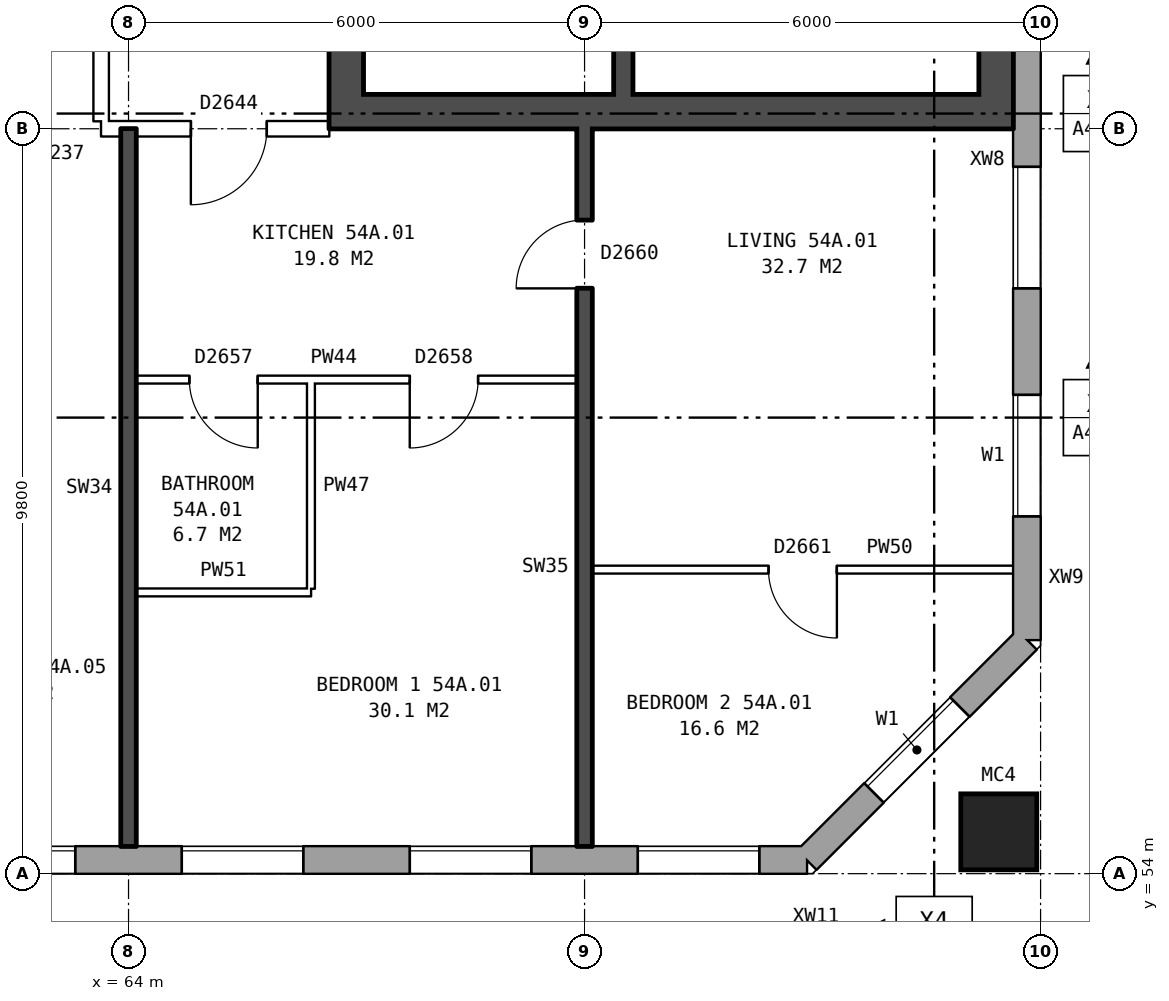
"""IFC4 building model, lengths in metres.
Left out: names, types, materials, properties, quantities, classifications, styles, units other than length and angle.
Written with IfcOpenShell. Run it as: python <this file> out.ifc"""

import sys

from ifc_helpers import new_model, si_unit, direction, frame, frame_2d, origin, origin_2d, place, context, subcontext, project, spatial, rectangle, hollow_rectangle, extrude, element, fill, save


model = new_model("IFC4")
c1 = context("Model", 3, precision=1e-05, world=origin(), true_north=direction((0.0, 1.0)))
c2 = subcontext(c1, "Body", "Model", "MODEL_VIEW")
j1 = project(units=[si_unit("LENGTHUNIT", "METRE"), si_unit("PLANEANGLEUNIT", "RADIAN")], contexts=[c1])
p1 = place(None, origin())
s1 = spatial("IfcSite", under=j1, at=p1, CompositionType="ELEMENT")
p2 = place(p1, origin())
s2 = spatial("IfcBuilding", under=s1, at=p2, CompositionType="ELEMENT")
p3 = place(p2, frame((0.0, 0.0, 191.3)))
s3 = spatial("IfcBuildingStorey", under=s2, at=p3, CompositionType="ELEMENT", Elevation=191.3)
p4 = place(p3, frame((75.45, 54.55, 0.0), z_axis=(0.0, 0.0, 1.0), x_axis=(1.0, 0.0, 0.0)))
e1 = element("IfcColumn", 1, at=p4, inside=s3, PredefinedType="COLUMN", context=c2, shape_type="SweptSolid", body=[
    extrude(hollow_rectangle(XDim=1.0, YDim=1.0, WallThickness=0.055, at=origin_2d()), origin(), (0.0, 0.0, 1.0), 3.1),
])
p5 = place(p3, frame((33.325, 54.18, 0.0), z_axis=(0.0, 0.0, 1.0), x_axis=(1.0, 0.0, 0.0)))
e2 = element("IfcWall", 2, at=p5, inside=s3, PredefinedType="STANDARD", context=c2, shape_type="SweptSolid", body=[
    extrude(rectangle(XDim=39.601, YDim=0.36, at=frame_2d((19.8, 0.0))), origin(), (0.0, 0.0, 1.0), 2.85),
])
p6 = place(p5, frame((1.375, 0.0, 0.8)))
e3 = element("IfcOpeningElement", 3, at=p6, cuts=e2, PredefinedType="OPENING", context=c2, shape_type="SweptSolid", body=[
    extrude(rectangle(XDim=1.6, YDim=1.8, at=frame_2d((0.8, 0.9))), frame((0.0, 0.19, 0.0), z_axis=(0.0, -1.0, 0.0), x_axis=(1.0, 0.0, 0.0)), (0.0, 0.0, 1.0), 0.38),
])
p7 = place(p5, frame((4.375, 0.0, 0.8)))
e4 = element("IfcOpeningElement", 4, at=p7, cuts=e2, PredefinedType="OPENING", context=c2, shape_type="SweptSolid", body=[
    extrude(rectangle(XDim=1.6, YDim=1.8, at=frame_2d((0.8, 0.9))), frame((0.0, 0.19, 0.0), z_axis=(0.0, -1.0, 0.0), x_axis=(1.0, 0.0, 0.0)), (0.0, 0.0, 1.0), 0.38),
])
p8 = place(p5, frame((7.375, 0.0, 0.8)))
e5 = element("IfcOpeningElement", 5, at=p8, cuts=e2, PredefinedType="OPENING", context=c2, shape_type="SweptSolid", body=[
    extrude(rectangle(XDim=1.6, YDim=1.8, at=frame_2d((0.8, 0.9))), frame((0.0, 0.19, 0.0), z_axis=(0.0, -1.0, 0.0), x_axis=(1.0, 0.0, 0.0)), (0.0, 0.0, 1.0), 0.38),
])
p9 = place(p5, frame((10.375, 0.0, 0.8)))
e6 = element("IfcOpeningElement", 6, at=p9, cuts=e2, PredefinedType="OPENING", context=c2, shape_type="SweptSolid", body=[
    extrude(rectangle(XDim=1.6, YDim=1.8, at=frame_2d((0.8, 0.9))), frame((0.0, 0.19, 0.0), z_axis=(0.0, -1.0, 0.0), x_axis=(1.0, 0.0, 0.0)), (0.0, 0.0, 1.0), 0.38),
])
p10 = place(p5, frame((13.375, 0.0, 0.8)))
e7 = element("IfcOpeningElement", 7, at=p10, cuts=e2, PredefinedType="OPENING", context=c2, shape_type="SweptSolid", body=[
    extrude(rectangle(XDim=1.6, YDim=1.8, at=frame_2d((0.8, 0.9))), frame((0.0, 0.19, 0.0), z_axis=(0.0, -1.0, 0.0), x_axis=(1.0, 0.0, 0.0)), (0.0, 0.0, 1.0), 0.38),
])
p11 = place(p5, frame((15.825, 0.0, 0.8)))
e8 = element("IfcOpeningElement", 8, at=p11, cuts=e2, PredefinedType="OPENING", context=c2, shape_type="SweptSolid", body=[
    extrude(rectangle(XDim=1.4, YDim=1.8, at=frame_2d((0.7, 0.9))), frame((0.0, 0.19, 0.0), z_axis=(0.0, -1.0, 0.0), x_axis=(1.0, 0.0, 0.0)), (0.0, 0.0, 1.0), 0.38),
])
p12 = place(p5, frame((18.975, 0.0, 0.15)))
e9 = element("IfcOpeningElement", 9, at=p12, cuts=e2, PredefinedType="OPENING", context=c2, shape_type="SweptSolid", body=[
    extrude(rectangle(XDim=1.6, YDim=1.2, at=frame_2d((0.8, 0.6))), frame((0.0, 0.19, 0.0), z_axis=(0.0, -1.0, 0.0), x_axis=(1.0, 0.0, 0.0)), (0.0, 0.0, 1.0), 0.38),
])
p13 = place(p5, frame((22.375, 0.0, 0.8)))
e10 = element("IfcOpeningElement", 10, at=p13, cuts=e2, PredefinedType="OPENING", context=c2, shape_type="SweptSolid", body=[
    extrude(rectangle(XDim=1.6, YDim=1.8, at=frame_2d((0.8, 0.9))), frame((0.0, 0.19, 0.0), z_axis=(0.0, -1.0, 0.0), x_axis=(1.0, 0.0, 0.0)), (0.0, 0.0, 1.0), 0.38),
])
p14 = place(p5, frame((25.375, 0.0, 0.8)))
e11 = element("IfcOpeningElement", 11, at=p14, cuts=e2, PredefinedType="OPENING", context=c2, shape_type="SweptSolid", body=[
    extrude(rectangle(XDim=1.6, YDim=1.8, at=frame_2d((0.8, 0.9))), frame((0.0, 0.19, 0.0), z_axis=(0.0, -1.0, 0.0), x_axis=(1.0, 0.0, 0.0)), (0.0, 0.0, 1.0), 0.38),
])
p15 = place(p5, frame((28.375, 0.0, 0.8)))
e12 = element("IfcOpeningElement", 12, at=p15, cuts=e2, PredefinedType="OPENING", context=c2, shape_type="SweptSolid", body=[
    extrude(rectangle(XDim=1.6, YDim=1.8, at=frame_2d((0.8, 0.9))), frame((0.0, 0.19, 0.0), z_axis=(0.0, -1.0, 0.0), x_axis=(1.0, 0.0, 0.0)), (0.0, 0.0, 1.0), 0.38),
])
p16 = place(p5, frame((31.375, 0.0, 0.8)))
e13 = element("IfcOpeningElement", 13, at=p16, cuts=e2, PredefinedType="OPENING", context=c2, shape_type="SweptSolid", body=[
    extrude(rectangle(XDim=1.6, YDim=1.8, at=frame_2d((0.8, 0.9))), frame((0.0, 0.19, 0.0), z_axis=(0.0, -1.0, 0.0), x_axis=(1.0, 0.0, 0.0)), (0.0, 0.0, 1.0), 0.38),
])
p17 = place(p5, frame((34.375, 0.0, 0.8)))
e14 = element("IfcOpeningElement", 14, at=p17, cuts=e2, PredefinedType="OPENING", context=c2, shape_type="SweptSolid", body=[
    extrude(rectangle(XDim=1.6, YDim=1.8, at=frame_2d((0.8, 0.9))), frame((0.0, 0.19, 0.0), z_axis=(0.0, -1.0, 0.0), x_axis=(1.0, 0.0, 0.0)), (0.0, 0.0, 1.0), 0.38),
])
p18 = place(p5, frame((37.375, 0.0, 0.8)))
e15 = element("IfcOpeningElement", 15, at=p18, cuts=e2, PredefinedType="OPENING", context=c2, shape_type="SweptSolid", body=[
    extrude(rectangle(XDim=1.6, YDim=1.8, at=frame_2d((0.8, 0.9))), frame((0.0, 0.19, 0.0), z_axis=(0.0, -1.0, 0.0), x_axis=(1.0, 0.0, 0.0)), (0.0, 0.0, 1.0), 0.38),
])
p19 = place(p5, frame((17.525, 0.0, 1.6)))
e16 = element("IfcOpeningElement", 16, at=p19, cuts=e2, PredefinedType="OPENING", context=c2, shape_type="SweptSolid", body=[
    extrude(rectangle(XDim=0.6, YDim=0.9, at=frame_2d((0.3, 0.45))), frame((0.0, 0.19, 0.0), z_axis=(0.0, -1.0, 0.0), x_axis=(1.0, 0.0, 0.0)), (0.0, 0.0, 1.0), 0.38),
])
p20 = place(p3, frame((72.925, 54.18, 0.0), z_axis=(0.0, 0.0, 1.0), x_axis=(0.707106781187, 0.707106781187, 0.0)))
e17 = element("IfcWall", 17, at=p20, inside=s3, PredefinedType="STANDARD", context=c2, shape_type="SweptSolid", body=[
    extrude(rectangle(XDim=4.094, YDim=0.36, at=frame_2d((2.047, 0.0))), origin(), (0.0, 0.0, 1.0), 2.85),
])
p21 = place(p20, frame((1.247, 0.0, 0.8)))
e18 = element("IfcOpeningElement", 18, at=p21, cuts=e17, PredefinedType="OPENING", context=c2, shape_type="SweptSolid", body=[
    extrude(rectangle(XDim=1.6, YDim=1.8, at=frame_2d((0.8, 0.9))), frame((0.0, 0.19, 0.0), z_axis=(0.0, -1.0, 0.0), x_axis=(1.0, 0.0, 0.0)), (0.0, 0.0, 1.0), 0.38),
])
p22 = place(p3, frame((75.82, 57.075, 0.0), z_axis=(0.0, 0.0, 1.0), x_axis=(0.0, 1.0, 0.0)))
e19 = element("IfcWall", 19, at=p22, inside=s3, PredefinedType="STANDARD", context=c2, shape_type="SweptSolid", body=[
    extrude(rectangle(XDim=6.522, YDim=0.36, at=frame_2d((3.261, 0.0))), origin(), (0.0, 0.0, 1.0), 2.85),
])
p23 = place(p22, frame((1.625, 0.0, 0.8)))
e20 = element("IfcOpeningElement", 20, at=p23, cuts=e19, PredefinedType="OPENING", context=c2, shape_type="SweptSolid", body=[
    extrude(rectangle(XDim=1.6, YDim=1.8, at=frame_2d((0.8, 0.9))), frame((0.0, 0.19, 0.0), z_axis=(0.0, -1.0, 0.0), x_axis=(1.0, 0.0, 0.0)), (0.0, 0.0, 1.0), 0.38),
])
p24 = place(p22, frame((4.625, 0.0, 0.8)))
e21 = element("IfcOpeningElement", 21, at=p24, cuts=e19, PredefinedType="OPENING", context=c2, shape_type="SweptSolid", body=[
    extrude(rectangle(XDim=1.6, YDim=1.8, at=frame_2d((0.8, 0.9))), frame((0.0, 0.19, 0.0), z_axis=(0.0, -1.0, 0.0), x_axis=(1.0, 0.0, 0.0)), (0.0, 0.0, 1.0), 0.38),
])
p25 = place(p3, frame((75.82, 63.597, 0.0), z_axis=(0.0, 0.0, 1.0), x_axis=(0.0, 1.0, 0.0)))
e22 = element("IfcWall", 22, at=p25, inside=s3, PredefinedType="STANDARD", context=c2, shape_type="SweptSolid", body=[
    extrude(rectangle(XDim=0.806, YDim=0.36, at=frame_2d((0.403, 0.0))), origin(), (0.0, 0.0, 1.0), 1.947),
])
p26 = place(p3, frame((75.82, 64.403, 0.0), z_axis=(0.0, 0.0, 1.0), x_axis=(0.0, 1.0, 0.0)))
e23 = element("IfcWall", 23, at=p26, inside=s3, PredefinedType="STANDARD", context=c2, shape_type="SweptSolid", body=[
    extrude(rectangle(XDim=11.194, YDim=0.36, at=frame_2d((5.597, 0.0))), origin(), (0.0, 0.0, 1.0), 2.85),
])
p27 = place(p3, frame((66.865, 63.8, 0.0), z_axis=(0.0, 0.0, 1.0), x_axis=(0.0, 1.0, 0.0)))
e24 = element("IfcWall", 24, at=p27, inside=s3, PredefinedType="SHEAR", context=c2, shape_type="SweptSolid", body=[
    extrude(rectangle(XDim=12.4, YDim=0.45, at=frame_2d((6.2, 0.0))), origin(), (0.0, 0.0, 1.0), 2.85),
])
p28 = place(p27, frame((1.325, 0.0, 0.0)))
e25 = element("IfcOpeningElement", 25, at=p28, cuts=e24, PredefinedType="OPENING", context=c2, shape_type="SweptSolid", body=[
    extrude(rectangle(XDim=1.1, YDim=2.1, at=frame_2d((0.55, 1.05))), frame((0.0, 0.235, 0.0), z_axis=(0.0, -1.0, 0.0), x_axis=(1.0, 0.0, 0.0)), (0.0, 0.0, 1.0), 0.47),
])
p29 = place(p27, frame((3.6, 0.0, 0.0)))
e26 = element("IfcOpeningElement", 26, at=p29, cuts=e24, PredefinedType="OPENING", context=c2, shape_type="SweptSolid", body=[
    extrude(rectangle(XDim=1.1, YDim=2.1, at=frame_2d((0.55, 1.05))), frame((0.0, 0.235, 0.0), z_axis=(0.0, -1.0, 0.0), x_axis=(1.0, 0.0, 0.0)), (0.0, 0.0, 1.0), 0.47),
])
p30 = place(p27, frame((5.8, 0.0, 0.0)))
e27 = element("IfcOpeningElement", 27, at=p30, cuts=e24, PredefinedType="OPENING", context=c2, shape_type="SweptSolid", body=[
    extrude(rectangle(XDim=1.1, YDim=2.1, at=frame_2d((0.55, 1.05))), frame((0.0, 0.235, 0.0), z_axis=(0.0, -1.0, 0.0), x_axis=(1.0, 0.0, 0.0)), (0.0, 0.0, 1.0), 0.47),
])
p31 = place(p27, frame((8.0, 0.0, 0.0)))
e28 = element("IfcOpeningElement", 28, at=p31, cuts=e24, PredefinedType="OPENING", context=c2, shape_type="SweptSolid", body=[
    extrude(rectangle(XDim=1.1, YDim=2.1, at=frame_2d((0.55, 1.05))), frame((0.0, 0.235, 0.0), z_axis=(0.0, -1.0, 0.0), x_axis=(1.0, 0.0, 0.0)), (0.0, 0.0, 1.0), 0.47),
])
p32 = place(p27, frame((9.9, 0.0, 0.0)))
e29 = element("IfcOpeningElement", 29, at=p32, cuts=e24, PredefinedType="OPENING", context=c2, shape_type="SweptSolid", body=[
    extrude(rectangle(XDim=1.1, YDim=2.1, at=frame_2d((0.55, 1.05))), frame((0.0, 0.235, 0.0), z_axis=(0.0, -1.0, 0.0), x_axis=(1.0, 0.0, 0.0)), (0.0, 0.0, 1.0), 0.47),
])
p33 = place(p3, frame((75.415, 63.8, 0.0), z_axis=(0.0, 0.0, 1.0), x_axis=(0.0, 1.0, 0.0)))
e30 = element("IfcWall", 30, at=p33, inside=s3, PredefinedType="SHEAR", context=c2, shape_type="SweptSolid", body=[
    extrude(rectangle(XDim=12.4, YDim=0.45, at=frame_2d((6.2, 0.0))), origin(), (0.0, 0.0, 1.0), 2.85),
])
p34 = place(p3, frame((67.09, 64.025, 0.0), z_axis=(0.0, 0.0, 1.0), x_axis=(1.0, 0.0, 0.0)))
e31 = element("IfcWall", 31, at=p34, inside=s3, PredefinedType="SHEAR", context=c2, shape_type="SweptSolid", body=[
    extrude(rectangle(XDim=8.1, YDim=0.45, at=frame_2d((4.05, 0.0))), origin(), (0.0, 0.0, 1.0), 2.85),
])
p35 = place(p3, frame((70.51, 64.25, 0.0), z_axis=(0.0, 0.0, 1.0), x_axis=(0.0, 1.0, 0.0)))
e32 = element("IfcWall", 32, at=p35, inside=s3, PredefinedType="SHEAR", context=c2, shape_type="SweptSolid", body=[
    extrude(rectangle(XDim=2.475, YDim=0.25, at=frame_2d((1.238, 0.0))), origin(), (0.0, 0.0, 1.0), 2.85),
])
p36 = place(p3, frame((63.64, 63.9, 0.0), z_axis=(0.0, 0.0, 1.0), x_axis=(0.0, 1.0, 0.0)))
e33 = element("IfcWall", 33, at=p36, inside=s3, PredefinedType="PARTITIONING", context=c2, shape_type="SweptSolid", body=[
    extrude(rectangle(XDim=12.2, YDim=0.2, at=frame_2d((6.1, 0.0))), origin(), (0.0, 0.0, 1.0), 2.85),
])
p37 = place(p36, frame((5.1, 0.0, 0.0)))
e34 = element("IfcOpeningElement", 34, at=p37, cuts=e33, PredefinedType="OPENING", context=c2, shape_type="SweptSolid", body=[
    extrude(rectangle(XDim=2.0, YDim=2.1, at=frame_2d((1.0, 1.05))), frame((0.0, 0.11, 0.0), z_axis=(0.0, -1.0, 0.0), x_axis=(1.0, 0.0, 0.0)), (0.0, 0.0, 1.0), 0.22),
])
p38 = place(p3, frame((64.1, 57.7, 0.0), z_axis=(0.0, 0.0, 1.0), x_axis=(1.0, 0.0, 0.0)))
e35 = element("IfcWall", 35, at=p38, inside=s3, PredefinedType="PARTITIONING", context=c2, shape_type="SweptSolid", body=[
    extrude(rectangle(XDim=2.3, YDim=0.1, at=frame_2d((1.15, 0.0))), origin(), (0.0, 0.0, 1.0), 2.85),
])
p39 = place(p3, frame((70.1, 58.0, 0.0), z_axis=(0.0, 0.0, 1.0), x_axis=(1.0, 0.0, 0.0)))
e36 = element("IfcWall", 36, at=p39, inside=s3, PredefinedType="PARTITIONING", context=c2, shape_type="SweptSolid", body=[
    extrude(rectangle(XDim=5.54, YDim=0.1, at=frame_2d((2.77, 0.0))), origin(), (0.0, 0.0, 1.0), 2.85),
])
p40 = place(p39, frame((2.32, 0.0, 0.0)))
e37 = element("IfcOpeningElement", 37, at=p40, cuts=e36, PredefinedType="OPENING", context=c2, shape_type="SweptSolid", body=[
    extrude(rectangle(XDim=0.9, YDim=2.1, at=frame_2d((0.45, 1.05))), frame((0.0, 0.06, 0.0), z_axis=(0.0, -1.0, 0.0), x_axis=(1.0, 0.0, 0.0)), (0.0, 0.0, 1.0), 0.12),
])
p41 = place(p3, frame((64.1, 60.5, 0.0), z_axis=(0.0, 0.0, 1.0), x_axis=(1.0, 0.0, 0.0)))
e38 = element("IfcWall", 38, at=p41, inside=s3, PredefinedType="PARTITIONING", context=c2, shape_type="SweptSolid", body=[
    extrude(rectangle(XDim=5.8, YDim=0.1, at=frame_2d((2.9, 0.0))), origin(), (0.0, 0.0, 1.0), 2.85),
])
p42 = place(p41, frame((3.6, 0.0, 0.0)))
e39 = element("IfcOpeningElement", 39, at=p42, cuts=e38, PredefinedType="OPENING", context=c2, shape_type="SweptSolid", body=[
    extrude(rectangle(XDim=0.9, YDim=2.1, at=frame_2d((0.45, 1.05))), frame((0.0, 0.06, 0.0), z_axis=(0.0, -1.0, 0.0), x_axis=(1.0, 0.0, 0.0)), (0.0, 0.0, 1.0), 0.12),
])
p43 = place(p41, frame((0.7, 0.0, 0.0)))
e40 = element("IfcOpeningElement", 40, at=p43, cuts=e38, PredefinedType="OPENING", context=c2, shape_type="SweptSolid", body=[
    extrude(rectangle(XDim=0.9, YDim=2.1, at=frame_2d((0.45, 1.05))), frame((0.0, 0.06, 0.0), z_axis=(0.0, -1.0, 0.0), x_axis=(1.0, 0.0, 0.0)), (0.0, 0.0, 1.0), 0.12),
])
p44 = place(p3, frame((63.64, 63.8, 0.0), z_axis=(0.0, 0.0, 1.0), x_axis=(1.0, 0.0, 0.0)))
e41 = element("IfcWall", 41, at=p44, inside=s3, PredefinedType="PARTITIONING", context=c2, shape_type="SweptSolid", body=[
    extrude(rectangle(XDim=3.0, YDim=0.2, at=frame_2d((1.5, 0.0))), origin(), (0.0, 0.0, 1.0), 2.85),
])
p45 = place(p44, frame((1.18, 0.0, 0.0)))
e42 = element("IfcOpeningElement", 42, at=p45, cuts=e41, PredefinedType="OPENING", context=c2, shape_type="SweptSolid", body=[
    extrude(rectangle(XDim=1.0, YDim=2.1, at=frame_2d((0.5, 1.05))), frame((0.0, 0.11, 0.0), z_axis=(0.0, -1.0, 0.0), x_axis=(1.0, 0.0, 0.0)), (0.0, 0.0, 1.0), 0.22),
])
p46 = place(p3, frame((64.0, 54.36, 0.0), z_axis=(0.0, 0.0, 1.0), x_axis=(0.0, 1.0, 0.0)))
e43 = element("IfcWall", 43, at=p46, inside=s3, PredefinedType="SOLIDWALL", context=c2, shape_type="SweptSolid", body=[
    extrude(rectangle(XDim=9.44, YDim=0.2, at=frame_2d((4.72, 0.0))), origin(), (0.0, 0.0, 1.0), 2.85),
])
p47 = place(p3, frame((66.4, 57.75, 0.0), z_axis=(0.0, 0.0, 1.0), x_axis=(0.0, 1.0, 0.0)))
e44 = element("IfcWall", 44, at=p47, inside=s3, PredefinedType="PARTITIONING", context=c2, shape_type="SweptSolid", body=[
    extrude(rectangle(XDim=2.7, YDim=0.1, at=frame_2d((1.35, 0.0))), origin(), (0.0, 0.0, 1.0), 2.85),
])
p48 = place(p3, frame((70.0, 54.36, 0.0), z_axis=(0.0, 0.0, 1.0), x_axis=(0.0, 1.0, 0.0)))
e45 = element("IfcWall", 45, at=p48, inside=s3, PredefinedType="SOLIDWALL", context=c2, shape_type="SweptSolid", body=[
    extrude(rectangle(XDim=9.44, YDim=0.2, at=frame_2d((4.72, 0.0))), origin(), (0.0, 0.0, 1.0), 2.85),
])
p49 = place(p48, frame((7.34, 0.0, 0.0)))
e46 = element("IfcOpeningElement", 46, at=p49, cuts=e45, PredefinedType="OPENING", context=c2, shape_type="SweptSolid", body=[
    extrude(rectangle(XDim=0.9, YDim=2.1, at=frame_2d((0.45, 1.05))), frame((0.0, 0.11, 0.0), z_axis=(0.0, -1.0, 0.0), x_axis=(1.0, 0.0, 0.0)), (0.0, 0.0, 1.0), 0.22),
])
p50 = place(p15, origin())
e47 = element("IfcWindow", 47, at=p50, inside=s3, PartitioningType="SINGLE_PANEL", PredefinedType="WINDOW", context=c2, shape_type="SweptSolid", body=[
    extrude(rectangle(XDim=1.6, YDim=1.8, at=frame_2d((0.8, 0.9))), frame((0.0, 0.15, 0.0), z_axis=(0.0, -1.0, 0.0), x_axis=(1.0, 0.0, 0.0)), (0.0, 0.0, 1.0), 0.06),
])
fill(e12, e47)
p51 = place(p16, origin())
e48 = element("IfcWindow", 48, at=p51, inside=s3, PartitioningType="SINGLE_PANEL", PredefinedType="WINDOW", context=c2, shape_type="SweptSolid", body=[
    extrude(rectangle(XDim=1.6, YDim=1.8, at=frame_2d((0.8, 0.9))), frame((0.0, 0.15, 0.0), z_axis=(0.0, -1.0, 0.0), x_axis=(1.0, 0.0, 0.0)), (0.0, 0.0, 1.0), 0.06),
])
fill(e13, e48)
p52 = place(p17, origin())
e49 = element("IfcWindow", 49, at=p52, inside=s3, PartitioningType="SINGLE_PANEL", PredefinedType="WINDOW", context=c2, shape_type="SweptSolid", body=[
    extrude(rectangle(XDim=1.6, YDim=1.8, at=frame_2d((0.8, 0.9))), frame((0.0, 0.15, 0.0), z_axis=(0.0, -1.0, 0.0), x_axis=(1.0, 0.0, 0.0)), (0.0, 0.0, 1.0), 0.06),
])
fill(e14, e49)
p53 = place(p18, origin())
e50 = element("IfcWindow", 50, at=p53, inside=s3, PartitioningType="SINGLE_PANEL", PredefinedType="WINDOW", context=c2, shape_type="SweptSolid", body=[
    extrude(rectangle(XDim=1.6, YDim=1.8, at=frame_2d((0.8, 0.9))), frame((0.0, 0.15, 0.0), z_axis=(0.0, -1.0, 0.0), x_axis=(1.0, 0.0, 0.0)), (0.0, 0.0, 1.0), 0.06),
])
fill(e15, e50)
p54 = place(p21, origin())
e51 = element("IfcWindow", 51, at=p54, inside=s3, PartitioningType="SINGLE_PANEL", PredefinedType="WINDOW", context=c2, shape_type="SweptSolid", body=[
    extrude(rectangle(XDim=1.6, YDim=1.8, at=frame_2d((0.8, 0.9))), frame((0.0, 0.15, 0.0), z_axis=(0.0, -1.0, 0.0), x_axis=(1.0, 0.0, 0.0)), (0.0, 0.0, 1.0), 0.06),
])
fill(e18, e51)
p55 = place(p23, origin())
e52 = element("IfcWindow", 52, at=p55, inside=s3, PartitioningType="SINGLE_PANEL", PredefinedType="WINDOW", context=c2, shape_type="SweptSolid", body=[
    extrude(rectangle(XDim=1.6, YDim=1.8, at=frame_2d((0.8, 0.9))), frame((0.0, 0.15, 0.0), z_axis=(0.0, -1.0, 0.0), x_axis=(1.0, 0.0, 0.0)), (0.0, 0.0, 1.0), 0.06),
])
fill(e20, e52)
p56 = place(p24, origin())
e53 = element("IfcWindow", 53, at=p56, inside=s3, PartitioningType="SINGLE_PANEL", PredefinedType="WINDOW", context=c2, shape_type="SweptSolid", body=[
    extrude(rectangle(XDim=1.6, YDim=1.8, at=frame_2d((0.8, 0.9))), frame((0.0, 0.15, 0.0), z_axis=(0.0, -1.0, 0.0), x_axis=(1.0, 0.0, 0.0)), (0.0, 0.0, 1.0), 0.06),
])
fill(e21, e53)
p57 = place(p42, frame((0.9, 0.0, 0.0), z_axis=(0.0, 0.0, 1.0), x_axis=(-1.0, 0.0, 0.0)))
e54 = element("IfcDoor", 54, at=p57, inside=s3, OperationType="SINGLE_SWING_RIGHT", PredefinedType="DOOR", context=c2, shape_type="SweptSolid", body=[
    extrude(rectangle(XDim=0.9, YDim=2.1, at=frame_2d((0.45, 1.05))), frame((0.0, 0.025, 0.0), z_axis=(0.0, -1.0, 0.0), x_axis=(1.0, 0.0, 0.0)), (0.0, 0.0, 1.0), 0.05),
])
fill(e39, e54)
p58 = place(p40, frame((0.9, 0.0, 0.0), z_axis=(0.0, 0.0, 1.0), x_axis=(-1.0, 0.0, 0.0)))
e55 = element("IfcDoor", 55, at=p58, inside=s3, OperationType="SINGLE_SWING_LEFT", PredefinedType="DOOR", context=c2, shape_type="SweptSolid", body=[
    extrude(rectangle(XDim=0.9, YDim=2.1, at=frame_2d((0.45, 1.05))), frame((0.0, 0.025, 0.0), z_axis=(0.0, -1.0, 0.0), x_axis=(1.0, 0.0, 0.0)), (0.0, 0.0, 1.0), 0.05),
])
fill(e37, e55)
p59 = place(p45, frame((1.0, 0.0, 0.0), z_axis=(0.0, 0.0, 1.0), x_axis=(-1.0, 0.0, 0.0)))
e56 = element("IfcDoor", 56, at=p59, inside=s3, OperationType="SINGLE_SWING_RIGHT", PredefinedType="DOOR", context=c2, shape_type="SweptSolid", body=[
    extrude(rectangle(XDim=1.0, YDim=2.1, at=frame_2d((0.5, 1.05))), frame((0.0, 0.025, 0.0), z_axis=(0.0, -1.0, 0.0), x_axis=(1.0, 0.0, 0.0)), (0.0, 0.0, 1.0), 0.05),
])
fill(e42, e56)
p60 = place(p49, origin())
e57 = element("IfcDoor", 57, at=p60, inside=s3, OperationType="SINGLE_SWING_LEFT", PredefinedType="DOOR", context=c2, shape_type="SweptSolid", body=[
    extrude(rectangle(XDim=0.9, YDim=2.1, at=frame_2d((0.45, 1.05))), frame((0.0, 0.025, 0.0), z_axis=(0.0, -1.0, 0.0), x_axis=(1.0, 0.0, 0.0)), (0.0, 0.0, 1.0), 0.05),
])
fill(e46, e57)
p61 = place(p43, frame((0.9, 0.0, 0.0), z_axis=(0.0, 0.0, 1.0), x_axis=(-1.0, 0.0, 0.0)))
e58 = element("IfcDoor", 58, at=p61, inside=s3, OperationType="SINGLE_SWING_LEFT", PredefinedType="DOOR", context=c2, shape_type="SweptSolid", body=[
    extrude(rectangle(XDim=0.9, YDim=2.1, at=frame_2d((0.45, 1.05))), frame((0.0, 0.025, 0.0), z_axis=(0.0, -1.0, 0.0), x_axis=(1.0, 0.0, 0.0)), (0.0, 0.0, 1.0), 0.05),
])
fill(e40, e58)
save(model, sys.argv[1])
